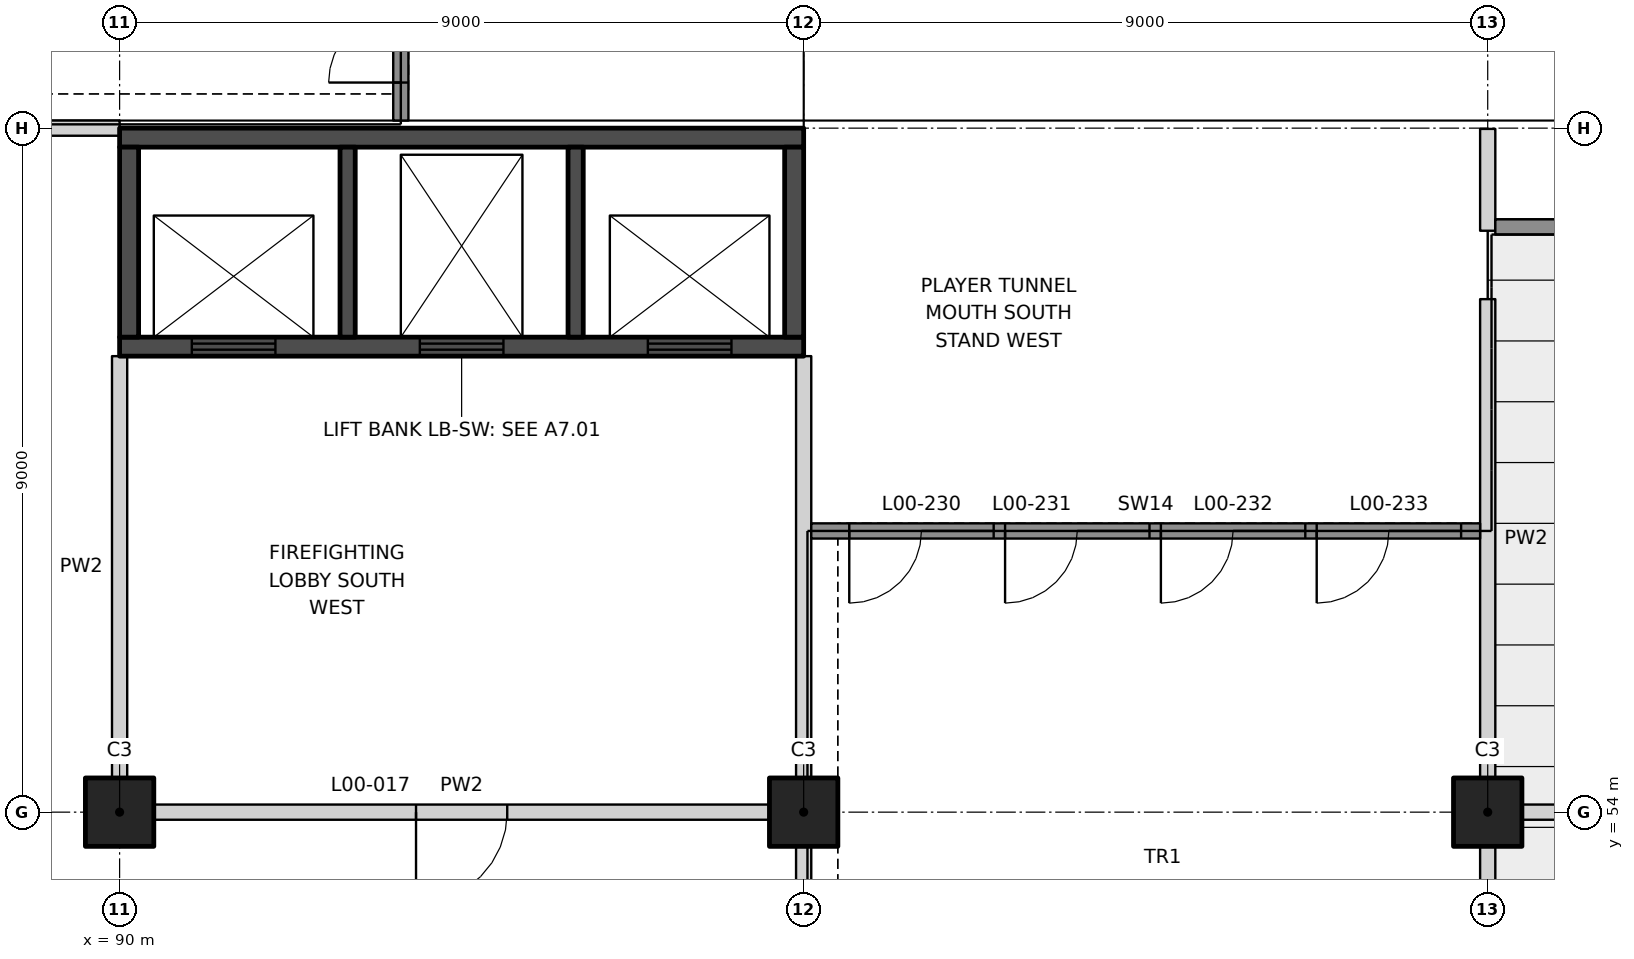
"""IFC4 building model, lengths in metres.
Left out: names, types, materials, properties, quantities, classifications, styles, units other than length and angle.
Written with IfcOpenShell. Run it as: python <this file> out.ifc"""

import sys

from ifc_helpers import new_model, si_unit, direction, frame, frame_2d, origin, origin_2d, place, context, subcontext, project, spatial, polyline, rectangle, outline, extrude, element, fill, save


model = new_model("IFC4")
c1 = context("Model", 3, precision=1e-05, world=origin(), true_north=direction((0.0, 1.0)))
c2 = subcontext(c1, "Body", "Model", "MODEL_VIEW")
j1 = project(units=[si_unit("LENGTHUNIT", "METRE"), si_unit("PLANEANGLEUNIT", "RADIAN")], contexts=[c1])
p1 = place(None, origin())
s1 = spatial("IfcSite", under=j1, at=p1, CompositionType="ELEMENT")
p2 = place(p1, origin())
s2 = spatial("IfcBuilding", under=s1, at=p2, CompositionType="ELEMENT")
p3 = place(p2, origin())
s3 = spatial("IfcBuildingStorey", under=s2, at=p3, CompositionType="ELEMENT", Elevation=0.0)
for number, where, z_axis, x_axis in (
    (1, (90.0, 54.0, 0.0), (0.0, 0.0, 1.0), (1.0, 0.0, 0.0)),
    (2, (99.0, 54.0, 0.0), (0.0, 0.0, 1.0), (1.0, 0.0, 0.0)),
):
    element("IfcColumn", number, at=place(p3, frame(where, z_axis=z_axis, x_axis=x_axis)), inside=s3, PredefinedType="COLUMN", context=c2, shape_type="SweptSolid", body=[
        extrude(rectangle(XDim=0.9, YDim=0.9, at=origin_2d()), origin(), (0.0, 0.0, 1.0), 7.0),
    ])
p4 = place(p3, frame((108.0, 54.0, 0.0), z_axis=(0.0, 0.0, 1.0), x_axis=(1.0, 0.0, 0.0)))
e3 = element("IfcColumn", 3, at=p4, inside=s3, PredefinedType="COLUMN", context=c2, shape_type="SweptSolid", body=[
    extrude(rectangle(XDim=0.9, YDim=0.9, at=origin_2d()), origin(), (0.0, 0.0, 1.0), 3.552),
])
p5 = place(p3, frame((90.45, 54.0, 0.0), z_axis=(0.0, 0.0, 1.0), x_axis=(1.0, 0.0, 0.0)))
e4 = element("IfcWall", 4, at=p5, inside=s3, PredefinedType="PARTITIONING", context=c2, shape_type="SweptSolid", body=[
    extrude(rectangle(XDim=8.1, YDim=0.2, at=frame_2d((4.05, 0.0))), origin(), (0.0, 0.0, 1.0), 5.75),
])
p6 = place(p5, frame((3.45, 0.0, 0.0)))
e5 = element("IfcOpeningElement", 5, at=p6, cuts=e4, PredefinedType="OPENING", context=c2, shape_type="SweptSolid", body=[
    extrude(rectangle(XDim=1.2, YDim=2.1, at=frame_2d((0.6, 1.05))), frame((0.0, 0.11, 0.0), z_axis=(0.0, -1.0, 0.0), x_axis=(1.0, 0.0, 0.0)), (0.0, 0.0, 1.0), 0.22),
])
p7 = place(p3, frame((108.45, 54.0, 0.0), z_axis=(0.0, 0.0, 1.0), x_axis=(1.0, 0.0, 0.0)))
e6 = element("IfcWall", 6, at=p7, inside=s3, PredefinedType="PARTITIONING", context=c2, shape_type="SweptSolid", body=[
    extrude(rectangle(XDim=8.1, YDim=0.2, at=frame_2d((4.05, 0.0))), origin(), (0.0, 0.0, 1.0), 4.445),
])
p8 = place(p3, frame((84.571, 63.0, 0.0), z_axis=(0.0, 0.0, 1.0), x_axis=(1.0, 0.0, 0.0)))
e7 = element("IfcWall", 7, at=p8, inside=s3, PredefinedType="PARTITIONING", context=c2, shape_type="SweptSolid", body=[
    extrude(rectangle(XDim=5.429, YDim=0.2, at=frame_2d((2.714, 0.0))), origin(), (0.0, 0.0, 1.0), 3.439),
])
p9 = place(p8, frame((0.029, 0.0, 0.0)))
e8 = element("IfcOpeningElement", 8, at=p9, cuts=e7, PredefinedType="OPENING", context=c2, shape_type="SweptSolid", body=[
    extrude(rectangle(XDim=1.8, YDim=2.1, at=frame_2d((0.9, 1.05))), frame((0.0, 0.11, 0.0), z_axis=(0.0, -1.0, 0.0), x_axis=(1.0, 0.0, 0.0)), (0.0, 0.0, 1.0), 0.22),
])
p10 = place(p3, frame((90.0, 54.45, 0.0), z_axis=(0.0, 0.0, 1.0), x_axis=(0.0, 1.0, 0.0)))
e9 = element("IfcWall", 9, at=p10, inside=s3, PredefinedType="PARTITIONING", context=c2, shape_type="SweptSolid", body=[
    extrude(rectangle(XDim=5.55, YDim=0.2, at=frame_2d((2.775, 0.0))), origin(), (0.0, 0.0, 1.0), 5.95),
])
p11 = place(p3, frame((99.0, 48.571, 0.0), z_axis=(0.0, 0.0, 1.0), x_axis=(0.0, 1.0, 0.0)))
e10 = element("IfcWall", 10, at=p11, inside=s3, PredefinedType="PARTITIONING", context=c2, shape_type="SweptSolid", body=[
    extrude(rectangle(XDim=4.979, YDim=0.2, at=frame_2d((2.49, 0.0))), origin(), (0.0, 0.0, 1.0), 3.439),
])
p12 = place(p3, frame((99.0, 54.45, 0.0), z_axis=(0.0, 0.0, 1.0), x_axis=(0.0, 1.0, 0.0)))
e11 = element("IfcWall", 11, at=p12, inside=s3, PredefinedType="PARTITIONING", context=c2, shape_type="SweptSolid", body=[
    extrude(rectangle(XDim=5.55, YDim=0.2, at=frame_2d((2.775, 0.0))), origin(), (0.0, 0.0, 1.0), 5.95),
])
p13 = place(p3, frame((108.0, 48.571, 0.0), z_axis=(0.0, 0.0, 1.0), x_axis=(0.0, 1.0, 0.0)))
e12 = element("IfcWall", 12, at=p13, inside=s3, PredefinedType="PARTITIONING", context=c2, shape_type="SweptSolid", body=[
    extrude(rectangle(XDim=4.979, YDim=0.2, at=frame_2d((2.49, 0.0))), origin(), (0.0, 0.0, 1.0), 3.439),
])
p14 = place(p13, frame((0.054, 0.0, 0.0)))
e13 = element("IfcOpeningElement", 13, at=p14, cuts=e12, PredefinedType="OPENING", context=c2, shape_type="SweptSolid", body=[
    extrude(rectangle(XDim=1.8, YDim=2.1, at=frame_2d((0.9, 1.05))), frame((0.0, 0.11, 0.0), z_axis=(0.0, -1.0, 0.0), x_axis=(1.0, 0.0, 0.0)), (0.0, 0.0, 1.0), 0.22),
])
p15 = place(p3, frame((108.0, 54.45, 0.0), z_axis=(0.0, 0.0, 1.0), x_axis=(0.0, 1.0, 0.0)))
e14 = element("IfcWall", 14, at=p15, inside=s3, PredefinedType="PARTITIONING", context=c2, shape_type="SweptSolid", body=[
    extrude(outline(polyline([(0.0, 0.0), (6.3, 0.0), (6.3, 0.239), (5.815, 0.469), (4.362, 1.159), (0.0, 3.231), (0.0, 0.0)])), frame((0.0, 0.1, 0.0), z_axis=(0.0, -1.0, 0.0), x_axis=(1.0, 0.0, 0.0)), (0.0, 0.0, 1.0), 0.2),
])
p16 = place(p3, frame((108.0, 61.65, 0.0), z_axis=(0.0, 0.0, 1.0), x_axis=(0.0, 1.0, 0.0)))
e15 = element("IfcWall", 15, at=p16, inside=s3, PredefinedType="PARTITIONING", context=c2, shape_type="SweptSolid", body=[
    extrude(outline(polyline([(0.0, 0.0), (1.34, 0.0), (1.34, 7.0), (0.447, 7.0), (0.0, -0.189), (0.0, 0.0)])), frame((0.0, 0.1, 0.0), z_axis=(0.0, -1.0, 0.0), x_axis=(1.0, 0.0, 0.0)), (0.0, 0.0, 1.0), 0.2),
])
p17 = place(p3, frame((90.0, 60.125, 0.0), z_axis=(0.0, 0.0, 1.0), x_axis=(1.0, 0.0, 0.0)))
e16 = element("IfcWall", 16, at=p17, inside=s3, PredefinedType="SHEAR", context=c2, shape_type="SweptSolid", body=[
    extrude(rectangle(XDim=9.0, YDim=0.25, at=frame_2d((4.5, 0.0))), origin(), (0.0, 0.0, 1.0), 7.0),
])
p18 = place(p17, frame((0.95, 0.0, 0.0)))
e17 = element("IfcOpeningElement", 17, at=p18, cuts=e16, PredefinedType="OPENING", context=c2, shape_type="SweptSolid", body=[
    extrude(rectangle(XDim=1.1, YDim=2.1, at=frame_2d((0.55, 1.05))), frame((0.0, 0.135, 0.0), z_axis=(0.0, -1.0, 0.0), x_axis=(1.0, 0.0, 0.0)), (0.0, 0.0, 1.0), 0.27),
])
p19 = place(p17, frame((3.95, 0.0, 0.0)))
e18 = element("IfcOpeningElement", 18, at=p19, cuts=e16, PredefinedType="OPENING", context=c2, shape_type="SweptSolid", body=[
    extrude(rectangle(XDim=1.1, YDim=2.1, at=frame_2d((0.55, 1.05))), frame((0.0, 0.135, 0.0), z_axis=(0.0, -1.0, 0.0), x_axis=(1.0, 0.0, 0.0)), (0.0, 0.0, 1.0), 0.27),
])
p20 = place(p17, frame((6.95, 0.0, 0.0)))
e19 = element("IfcOpeningElement", 19, at=p20, cuts=e16, PredefinedType="OPENING", context=c2, shape_type="SweptSolid", body=[
    extrude(rectangle(XDim=1.1, YDim=2.1, at=frame_2d((0.55, 1.05))), frame((0.0, 0.135, 0.0), z_axis=(0.0, -1.0, 0.0), x_axis=(1.0, 0.0, 0.0)), (0.0, 0.0, 1.0), 0.27),
])
p21 = place(p3, frame((90.0, 62.875, 0.0), z_axis=(0.0, 0.0, 1.0), x_axis=(1.0, 0.0, 0.0)))
e20 = element("IfcWall", 20, at=p21, inside=s3, PredefinedType="SHEAR", context=c2, shape_type="SweptSolid", body=[
    extrude(rectangle(XDim=9.0, YDim=0.25, at=frame_2d((4.5, 0.0))), origin(), (0.0, 0.0, 1.0), 7.0),
])
for number, where, z_axis, x_axis in (
    (21, (90.125, 60.25, 0.0), (0.0, 0.0, 1.0), (0.0, 1.0, 0.0)),
    (22, (98.875, 60.25, 0.0), (0.0, 0.0, 1.0), (0.0, 1.0, 0.0)),
):
    element("IfcWall", number, at=place(p3, frame(where, z_axis=z_axis, x_axis=x_axis)), inside=s3, PredefinedType="SHEAR", context=c2, shape_type="SweptSolid", body=[
        extrude(rectangle(XDim=2.5, YDim=0.25, at=frame_2d((1.25, 0.0))), origin(), (0.0, 0.0, 1.0), 7.0),
    ])
for number, where, z_axis, x_axis in (
    (23, (93.0, 60.25, 0.0), (0.0, 0.0, 1.0), (0.0, 1.0, 0.0)),
    (24, (96.0, 60.25, 0.0), (0.0, 0.0, 1.0), (0.0, 1.0, 0.0)),
):
    element("IfcWall", number, at=place(p3, frame(where, z_axis=z_axis, x_axis=x_axis)), inside=s3, PredefinedType="SHEAR", context=c2, shape_type="SweptSolid", body=[
        extrude(rectangle(XDim=2.5, YDim=0.2, at=frame_2d((1.25, 0.0))), origin(), (0.0, 0.0, 1.0), 7.0),
    ])
p22 = place(p3, frame((99.1, 57.7, 0.0), z_axis=(0.0, 0.0, 1.0), x_axis=(1.0, 0.0, 0.0)))
e25 = element("IfcWall", 25, at=p22, inside=s3, PredefinedType="SOLIDWALL", context=c2, shape_type="SweptSolid", body=[
    extrude(rectangle(XDim=8.8, YDim=0.2, at=frame_2d((4.4, 0.0))), origin(), (0.0, 0.0, 1.0), 2.64),
])
p23 = place(p22, frame((0.5, 0.0, 0.0)))
e26 = element("IfcOpeningElement", 26, at=p23, cuts=e25, PredefinedType="OPENING", context=c2, shape_type="SweptSolid", body=[
    extrude(rectangle(XDim=1.9, YDim=2.1, at=frame_2d((0.95, 1.05))), frame((0.0, 0.11, 0.0), z_axis=(0.0, -1.0, 0.0), x_axis=(1.0, 0.0, 0.0)), (0.0, 0.0, 1.0), 0.22),
])
p24 = place(p22, frame((2.55, 0.0, 0.0)))
e27 = element("IfcOpeningElement", 27, at=p24, cuts=e25, PredefinedType="OPENING", context=c2, shape_type="SweptSolid", body=[
    extrude(rectangle(XDim=1.9, YDim=2.1, at=frame_2d((0.95, 1.05))), frame((0.0, 0.11, 0.0), z_axis=(0.0, -1.0, 0.0), x_axis=(1.0, 0.0, 0.0)), (0.0, 0.0, 1.0), 0.22),
])
p25 = place(p22, frame((4.6, 0.0, 0.0)))
e28 = element("IfcOpeningElement", 28, at=p25, cuts=e25, PredefinedType="OPENING", context=c2, shape_type="SweptSolid", body=[
    extrude(rectangle(XDim=1.9, YDim=2.1, at=frame_2d((0.95, 1.05))), frame((0.0, 0.11, 0.0), z_axis=(0.0, -1.0, 0.0), x_axis=(1.0, 0.0, 0.0)), (0.0, 0.0, 1.0), 0.22),
])
p26 = place(p22, frame((6.65, 0.0, 0.0)))
e29 = element("IfcOpeningElement", 29, at=p26, cuts=e25, PredefinedType="OPENING", context=c2, shape_type="SweptSolid", body=[
    extrude(rectangle(XDim=1.9, YDim=2.1, at=frame_2d((0.95, 1.05))), frame((0.0, 0.11, 0.0), z_axis=(0.0, -1.0, 0.0), x_axis=(1.0, 0.0, 0.0)), (0.0, 0.0, 1.0), 0.22),
])
p27 = place(p3, frame((93.7, 63.1, 0.0), z_axis=(0.0, 0.0, 1.0), x_axis=(0.0, 1.0, 0.0)))
e30 = element("IfcWall", 30, at=p27, inside=s3, PredefinedType="SOLIDWALL", context=c2, shape_type="SweptSolid", body=[
    extrude(rectangle(XDim=8.8, YDim=0.2, at=frame_2d((4.4, 0.0))), origin(), (0.0, 0.0, 1.0), 2.64),
])
p28 = place(p27, frame((0.5, 0.0, 0.0)))
e31 = element("IfcOpeningElement", 31, at=p28, cuts=e30, PredefinedType="OPENING", context=c2, shape_type="SweptSolid", body=[
    extrude(rectangle(XDim=1.9, YDim=2.1, at=frame_2d((0.95, 1.05))), frame((0.0, 0.11, 0.0), z_axis=(0.0, -1.0, 0.0), x_axis=(1.0, 0.0, 0.0)), (0.0, 0.0, 1.0), 0.22),
])
p29 = place(p27, frame((2.55, 0.0, 0.0)))
e32 = element("IfcOpeningElement", 32, at=p29, cuts=e30, PredefinedType="OPENING", context=c2, shape_type="SweptSolid", body=[
    extrude(rectangle(XDim=1.9, YDim=2.1, at=frame_2d((0.95, 1.05))), frame((0.0, 0.11, 0.0), z_axis=(0.0, -1.0, 0.0), x_axis=(1.0, 0.0, 0.0)), (0.0, 0.0, 1.0), 0.22),
])
p30 = place(p27, frame((4.6, 0.0, 0.0)))
e33 = element("IfcOpeningElement", 33, at=p30, cuts=e30, PredefinedType="OPENING", context=c2, shape_type="SweptSolid", body=[
    extrude(rectangle(XDim=1.9, YDim=2.1, at=frame_2d((0.95, 1.05))), frame((0.0, 0.11, 0.0), z_axis=(0.0, -1.0, 0.0), x_axis=(1.0, 0.0, 0.0)), (0.0, 0.0, 1.0), 0.22),
])
p31 = place(p27, frame((6.65, 0.0, 0.0)))
e34 = element("IfcOpeningElement", 34, at=p31, cuts=e30, PredefinedType="OPENING", context=c2, shape_type="SweptSolid", body=[
    extrude(rectangle(XDim=1.9, YDim=2.1, at=frame_2d((0.95, 1.05))), frame((0.0, 0.11, 0.0), z_axis=(0.0, -1.0, 0.0), x_axis=(1.0, 0.0, 0.0)), (0.0, 0.0, 1.0), 0.22),
])
p32 = place(p3, frame((108.1, 61.7, 0.0), z_axis=(0.0, 0.0, 1.0), x_axis=(1.0, 0.0, 0.0)))
e35 = element("IfcWall", 35, at=p32, inside=s3, PredefinedType="SOLIDWALL", context=c2, shape_type="SweptSolid", body=[
    extrude(rectangle(XDim=16.4, YDim=0.2, at=frame_2d((8.2, 0.0))), origin(), (0.0, 0.0, 1.0), 0.74),
])
p33 = place(p6, frame((1.2, 0.0, 0.0), z_axis=(0.0, 0.0, 1.0), x_axis=(-1.0, 0.0, 0.0)))
e36 = element("IfcDoor", 36, at=p33, inside=s3, OperationType="SINGLE_SWING_RIGHT", PredefinedType="DOOR", context=c2, shape_type="SweptSolid", body=[
    extrude(rectangle(XDim=1.2, YDim=2.1, at=frame_2d((0.6, 1.05))), frame((0.0, 0.025, 0.0), z_axis=(0.0, -1.0, 0.0), x_axis=(1.0, 0.0, 0.0)), (0.0, 0.0, 1.0), 0.05),
])
fill(e5, e36)
p34 = place(p18, origin())
e37 = element("IfcDoor", 37, at=p34, inside=s3, OperationType="DOUBLE_DOOR_SLIDING", PredefinedType="DOOR", context=c2, shape_type="SweptSolid", body=[
    extrude(rectangle(XDim=1.1, YDim=2.1, at=frame_2d((0.55, 1.05))), frame((0.0, 0.025, 0.0), z_axis=(0.0, -1.0, 0.0), x_axis=(1.0, 0.0, 0.0)), (0.0, 0.0, 1.0), 0.05),
])
fill(e17, e37)
p35 = place(p19, origin())
e38 = element("IfcDoor", 38, at=p35, inside=s3, OperationType="DOUBLE_DOOR_SLIDING", PredefinedType="DOOR", context=c2, shape_type="SweptSolid", body=[
    extrude(rectangle(XDim=1.1, YDim=2.1, at=frame_2d((0.55, 1.05))), frame((0.0, 0.025, 0.0), z_axis=(0.0, -1.0, 0.0), x_axis=(1.0, 0.0, 0.0)), (0.0, 0.0, 1.0), 0.05),
])
fill(e18, e38)
p36 = place(p20, origin())
e39 = element("IfcDoor", 39, at=p36, inside=s3, OperationType="DOUBLE_DOOR_SLIDING", PredefinedType="DOOR", context=c2, shape_type="SweptSolid", body=[
    extrude(rectangle(XDim=1.1, YDim=2.1, at=frame_2d((0.55, 1.05))), frame((0.0, 0.025, 0.0), z_axis=(0.0, -1.0, 0.0), x_axis=(1.0, 0.0, 0.0)), (0.0, 0.0, 1.0), 0.05),
])
fill(e19, e39)
p37 = place(p23, frame((1.9, 0.0, 0.0), z_axis=(0.0, 0.0, 1.0), x_axis=(-1.0, 0.0, 0.0)))
e40 = element("IfcDoor", 40, at=p37, inside=s3, OperationType="DOUBLE_DOOR_SINGLE_SWING", PredefinedType="DOOR", context=c2, shape_type="SweptSolid", body=[
    extrude(rectangle(XDim=1.9, YDim=2.1, at=frame_2d((0.95, 1.05))), frame((0.0, 0.025, 0.0), z_axis=(0.0, -1.0, 0.0), x_axis=(1.0, 0.0, 0.0)), (0.0, 0.0, 1.0), 0.05),
])
fill(e26, e40)
p38 = place(p24, frame((1.9, 0.0, 0.0), z_axis=(0.0, 0.0, 1.0), x_axis=(-1.0, 0.0, 0.0)))
e41 = element("IfcDoor", 41, at=p38, inside=s3, OperationType="DOUBLE_DOOR_SINGLE_SWING", PredefinedType="DOOR", context=c2, shape_type="SweptSolid", body=[
    extrude(rectangle(XDim=1.9, YDim=2.1, at=frame_2d((0.95, 1.05))), frame((0.0, 0.025, 0.0), z_axis=(0.0, -1.0, 0.0), x_axis=(1.0, 0.0, 0.0)), (0.0, 0.0, 1.0), 0.05),
])
fill(e27, e41)
p39 = place(p25, frame((1.9, 0.0, 0.0), z_axis=(0.0, 0.0, 1.0), x_axis=(-1.0, 0.0, 0.0)))
e42 = element("IfcDoor", 42, at=p39, inside=s3, OperationType="DOUBLE_DOOR_SINGLE_SWING", PredefinedType="DOOR", context=c2, shape_type="SweptSolid", body=[
    extrude(rectangle(XDim=1.9, YDim=2.1, at=frame_2d((0.95, 1.05))), frame((0.0, 0.025, 0.0), z_axis=(0.0, -1.0, 0.0), x_axis=(1.0, 0.0, 0.0)), (0.0, 0.0, 1.0), 0.05),
])
fill(e28, e42)
p40 = place(p26, frame((1.9, 0.0, 0.0), z_axis=(0.0, 0.0, 1.0), x_axis=(-1.0, 0.0, 0.0)))
e43 = element("IfcDoor", 43, at=p40, inside=s3, OperationType="DOUBLE_DOOR_SINGLE_SWING", PredefinedType="DOOR", context=c2, shape_type="SweptSolid", body=[
    extrude(rectangle(XDim=1.9, YDim=2.1, at=frame_2d((0.95, 1.05))), frame((0.0, 0.025, 0.0), z_axis=(0.0, -1.0, 0.0), x_axis=(1.0, 0.0, 0.0)), (0.0, 0.0, 1.0), 0.05),
])
fill(e29, e43)
p41 = place(p28, origin())
e44 = element("IfcDoor", 44, at=p41, inside=s3, OperationType="DOUBLE_DOOR_SINGLE_SWING", PredefinedType="DOOR", context=c2, shape_type="SweptSolid", body=[
    extrude(rectangle(XDim=1.9, YDim=2.1, at=frame_2d((0.95, 1.05))), frame((0.0, 0.025, 0.0), z_axis=(0.0, -1.0, 0.0), x_axis=(1.0, 0.0, 0.0)), (0.0, 0.0, 1.0), 0.05),
])
fill(e31, e44)
save(model, sys.argv[1])
